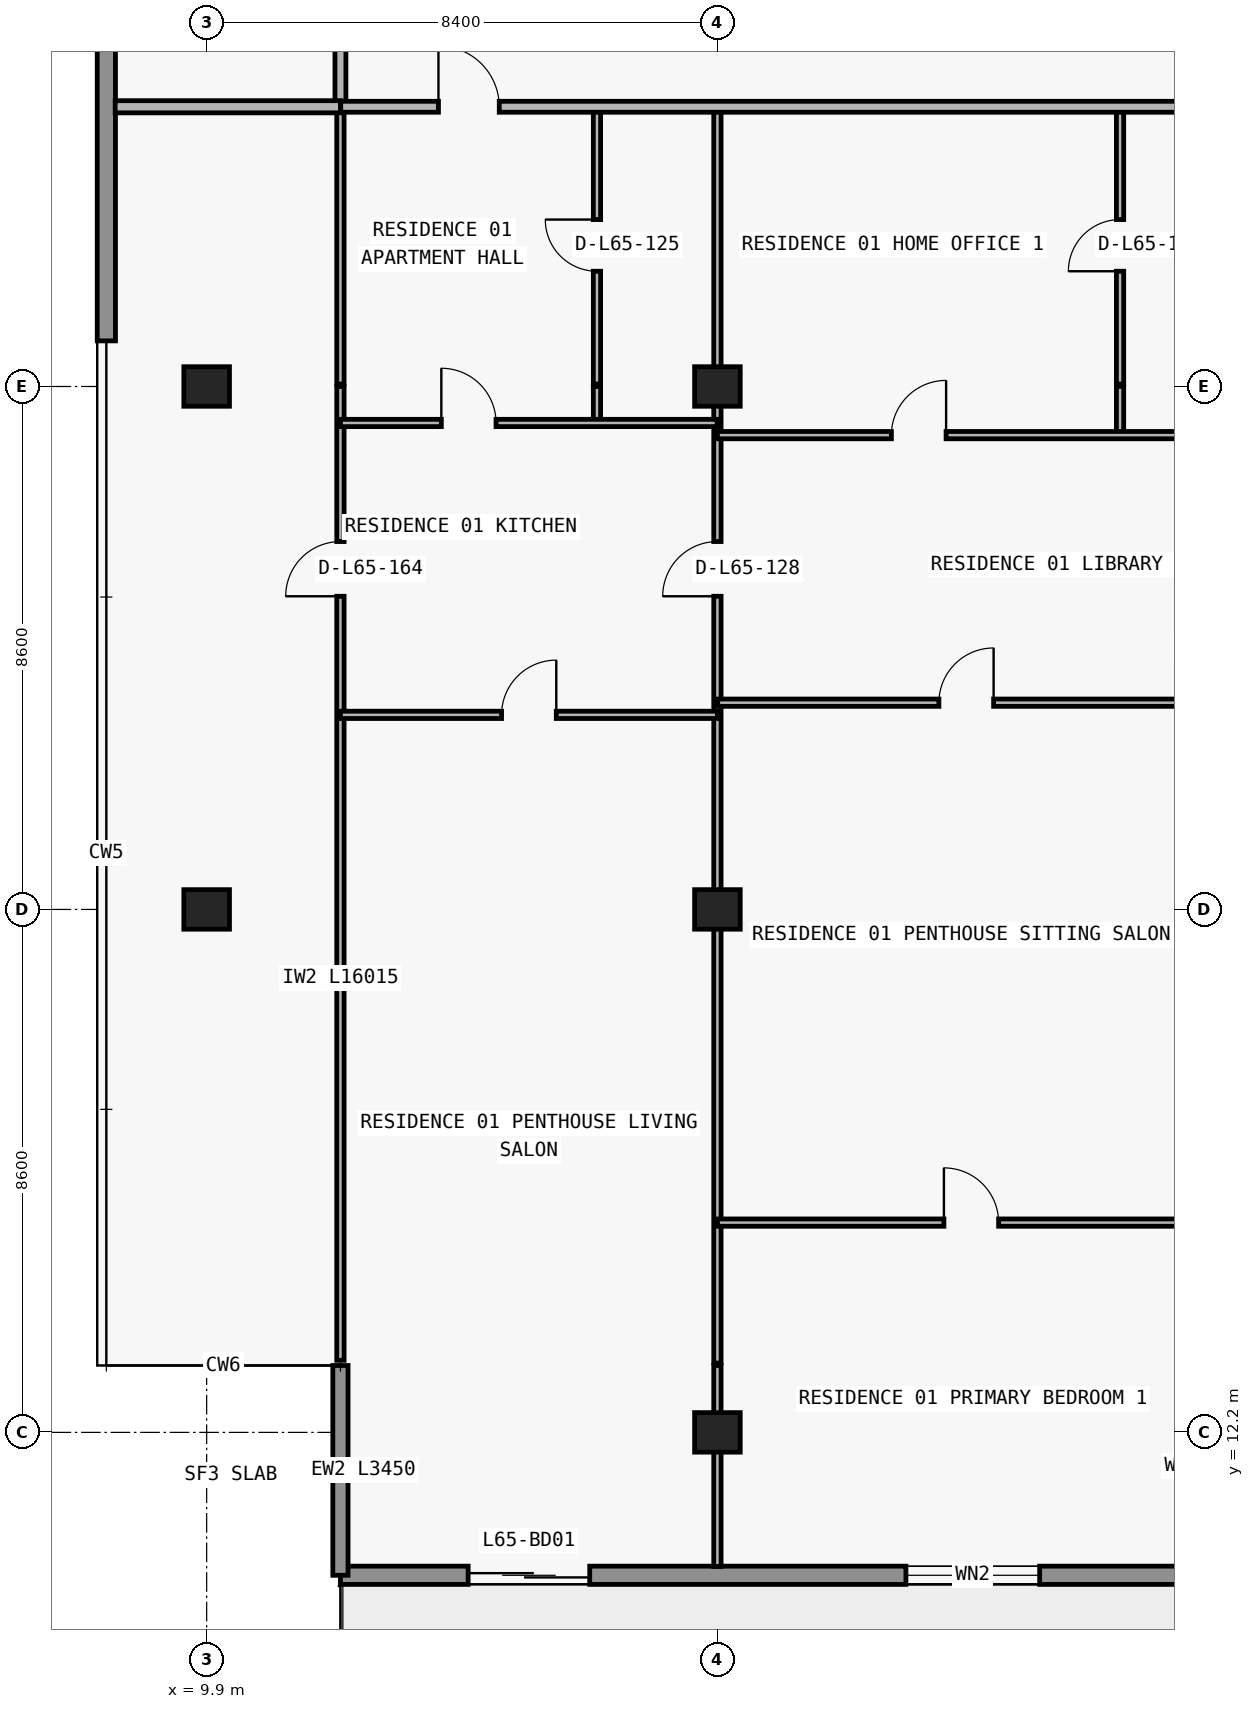
"""IFC4 building model, lengths in metres.
Left out: names, types, materials, properties, quantities, classifications, styles, units other than length and angle.
Written with IfcOpenShell. Run it as: python <this file> out.ifc"""

import sys

from ifc_helpers import new_model, si_unit, direction, frame, frame_2d, origin, origin_2d, place, context, subcontext, project, spatial, rectangle, extrude, element, fill, save


model = new_model("IFC4")
c1 = context("Model", 3, precision=1e-05, world=origin(), true_north=direction((0.0, 1.0)))
c2 = subcontext(c1, "Body", "Model", "MODEL_VIEW")
j1 = project(units=[si_unit("LENGTHUNIT", "METRE"), si_unit("PLANEANGLEUNIT", "RADIAN")], contexts=[c1])
p1 = place(None, origin())
s1 = spatial("IfcSite", under=j1, at=p1, CompositionType="ELEMENT")
p2 = place(p1, origin())
s2 = spatial("IfcBuilding", under=s1, at=p2, CompositionType="ELEMENT")
p3 = place(p2, frame((0.0, 0.0, 233.1)))
s3 = spatial("IfcBuildingStorey", under=s2, at=p3, CompositionType="ELEMENT", Elevation=233.1)
for number, where, z_axis, x_axis in (
    (1, (18.3, 12.2, 0.0), (0.0, 0.0, 1.0), (1.0, 0.0, 0.0)),
    (2, (9.9, 20.8, 0.0), (0.0, 0.0, 1.0), (1.0, 0.0, 0.0)),
    (3, (18.3, 20.8, 0.0), (0.0, 0.0, 1.0), (1.0, 0.0, 0.0)),
    (4, (9.9, 29.4, 0.0), (0.0, 0.0, 1.0), (1.0, 0.0, 0.0)),
    (5, (18.3, 29.4, 0.0), (0.0, 0.0, 1.0), (1.0, 0.0, 0.0)),
):
    element("IfcColumn", number, at=place(p3, frame(where, z_axis=z_axis, x_axis=x_axis)), inside=s3, PredefinedType="COLUMN", context=c2, shape_type="SweptSolid", body=[
        extrude(rectangle(XDim=0.75, YDim=0.65, at=origin_2d()), origin(), (0.0, 0.0, 1.0), 3.05),
    ])
p4 = place(p3, frame((65.7, 9.85, 0.0), z_axis=(0.0, 0.0, 1.0), x_axis=(-1.0, 0.0, 0.0)))
e6 = element("IfcWall", 6, at=p4, inside=s3, PredefinedType="STANDARD", context=c2, shape_type="SweptSolid", body=[
    extrude(rectangle(XDim=53.6, YDim=0.3, at=frame_2d((26.8, 0.0))), origin(), (0.0, 0.0, 1.0), 3.05),
])
p5 = place(p4, frame((49.5, 0.0, 0.0)))
e7 = element("IfcOpeningElement", 7, at=p5, cuts=e6, PredefinedType="OPENING", context=c2, shape_type="SweptSolid", body=[
    extrude(rectangle(XDim=2.0, YDim=2.3, at=frame_2d((1.0, 1.15))), frame((0.0, 0.16, 0.0), z_axis=(0.0, -1.0, 0.0), x_axis=(1.0, 0.0, 0.0)), (0.0, 0.0, 1.0), 0.32),
])
p6 = place(p4, frame((42.1, 0.0, 0.85)))
e8 = element("IfcOpeningElement", 8, at=p6, cuts=e6, PredefinedType="OPENING", context=c2, shape_type="SweptSolid", body=[
    extrude(rectangle(XDim=2.2, YDim=1.55, at=frame_2d((1.1, 0.775))), frame((0.0, 0.16, 0.0), z_axis=(0.0, -1.0, 0.0), x_axis=(1.0, 0.0, 0.0)), (0.0, 0.0, 1.0), 0.32),
])
p7 = place(p4, frame((35.69, 0.0, 0.0)))
e9 = element("IfcOpeningElement", 9, at=p7, cuts=e6, PredefinedType="OPENING", context=c2, shape_type="SweptSolid", body=[
    extrude(rectangle(XDim=2.0, YDim=2.3, at=frame_2d((1.0, 1.15))), frame((0.0, 0.16, 0.0), z_axis=(0.0, -1.0, 0.0), x_axis=(1.0, 0.0, 0.0)), (0.0, 0.0, 1.0), 0.32),
])
p8 = place(p4, frame((31.59, 0.0, 0.85)))
e10 = element("IfcOpeningElement", 10, at=p8, cuts=e6, PredefinedType="OPENING", context=c2, shape_type="SweptSolid", body=[
    extrude(rectangle(XDim=1.8, YDim=1.55, at=frame_2d((0.9, 0.775))), frame((0.0, 0.16, 0.0), z_axis=(0.0, -1.0, 0.0), x_axis=(1.0, 0.0, 0.0)), (0.0, 0.0, 1.0), 0.32),
])
p9 = place(p4, frame((23.914, 0.0, 0.85)))
e11 = element("IfcOpeningElement", 11, at=p9, cuts=e6, PredefinedType="OPENING", context=c2, shape_type="SweptSolid", body=[
    extrude(rectangle(XDim=2.2, YDim=1.55, at=frame_2d((1.1, 0.775))), frame((0.0, 0.16, 0.0), z_axis=(0.0, -1.0, 0.0), x_axis=(1.0, 0.0, 0.0)), (0.0, 0.0, 1.0), 0.32),
])
p10 = place(p4, frame((19.69, 0.0, 0.0)))
e12 = element("IfcOpeningElement", 12, at=p10, cuts=e6, PredefinedType="OPENING", context=c2, shape_type="SweptSolid", body=[
    extrude(rectangle(XDim=2.0, YDim=2.3, at=frame_2d((1.0, 1.15))), frame((0.0, 0.16, 0.0), z_axis=(0.0, -1.0, 0.0), x_axis=(1.0, 0.0, 0.0)), (0.0, 0.0, 1.0), 0.32),
])
p11 = place(p4, frame((15.59, 0.0, 0.85)))
e13 = element("IfcOpeningElement", 13, at=p11, cuts=e6, PredefinedType="OPENING", context=c2, shape_type="SweptSolid", body=[
    extrude(rectangle(XDim=1.8, YDim=1.55, at=frame_2d((0.9, 0.775))), frame((0.0, 0.16, 0.0), z_axis=(0.0, -1.0, 0.0), x_axis=(1.0, 0.0, 0.0)), (0.0, 0.0, 1.0), 0.32),
])
p12 = place(p4, frame((11.69, 0.0, 0.0)))
e14 = element("IfcOpeningElement", 14, at=p12, cuts=e6, PredefinedType="OPENING", context=c2, shape_type="SweptSolid", body=[
    extrude(rectangle(XDim=2.0, YDim=2.3, at=frame_2d((1.0, 1.15))), frame((0.0, 0.16, 0.0), z_axis=(0.0, -1.0, 0.0), x_axis=(1.0, 0.0, 0.0)), (0.0, 0.0, 1.0), 0.32),
])
p13 = place(p4, frame((7.01, 0.0, 0.65)))
e15 = element("IfcOpeningElement", 15, at=p13, cuts=e6, PredefinedType="OPENING", context=c2, shape_type="SweptSolid", body=[
    extrude(rectangle(XDim=2.6, YDim=1.85, at=frame_2d((1.3, 0.925))), frame((0.0, 0.16, 0.0), z_axis=(0.0, -1.0, 0.0), x_axis=(1.0, 0.0, 0.0)), (0.0, 0.0, 1.0), 0.32),
])
p14 = place(p4, frame((2.0, 0.0, 0.85)))
e16 = element("IfcOpeningElement", 16, at=p14, cuts=e6, PredefinedType="OPENING", context=c2, shape_type="SweptSolid", body=[
    extrude(rectangle(XDim=2.2, YDim=1.55, at=frame_2d((1.1, 0.775))), frame((0.0, 0.16, 0.0), z_axis=(0.0, -1.0, 0.0), x_axis=(1.0, 0.0, 0.0)), (0.0, 0.0, 1.0), 0.32),
])
p15 = place(p3, frame((12.1, 13.3, 0.0), z_axis=(0.0, 0.0, 1.0), x_axis=(0.0, -1.0, 0.0)))
e17 = element("IfcWall", 17, at=p15, inside=s3, PredefinedType="ELEMENTEDWALL", context=c2, shape_type="SweptSolid", body=[
    extrude(rectangle(XDim=3.45, YDim=0.25, at=frame_2d((1.725, 0.0))), origin(), (0.0, 0.0, 1.0), 3.05),
])
p16 = place(p3, frame((8.25, 30.15, 0.0), z_axis=(0.0, 0.0, 1.0), x_axis=(0.0, 1.0, 0.0)))
e18 = element("IfcWall", 18, at=p16, inside=s3, PredefinedType="STANDARD", context=c2, shape_type="SweptSolid", body=[
    extrude(rectangle(XDim=16.85, YDim=0.3, at=frame_2d((8.425, 0.0))), origin(), (0.0, 0.0, 1.0), 3.05),
])
p17 = place(p3, frame((12.1, 13.385, 0.0), z_axis=(0.0, 0.0, 1.0), x_axis=(0.0, 1.0, 0.0)))
e19 = element("IfcWall", 19, at=p17, inside=s3, PredefinedType="PARTITIONING", context=c2, shape_type="SweptSolid", body=[
    extrude(rectangle(XDim=16.015, YDim=0.12, at=frame_2d((8.007, 0.0))), origin(), (0.0, 0.0, 1.0), 2.725),
])
p18 = place(p17, frame((12.565, 0.0, 0.0)))
e20 = element("IfcOpeningElement", 20, at=p18, cuts=e19, PredefinedType="OPENING", context=c2, shape_type="SweptSolid", body=[
    extrude(rectangle(XDim=0.9, YDim=2.15, at=frame_2d((0.45, 1.075))), frame((0.0, 0.07, 0.0), z_axis=(0.0, -1.0, 0.0), x_axis=(1.0, 0.0, 0.0)), (0.0, 0.0, 1.0), 0.14),
])
p19 = place(p3, frame((12.1, 29.44, 0.0), z_axis=(0.0, 0.0, 1.0), x_axis=(0.0, 1.0, 0.0)))
e21 = element("IfcWall", 21, at=p19, inside=s3, PredefinedType="PARTITIONING", context=c2, shape_type="SweptSolid", body=[
    extrude(rectangle(XDim=4.56, YDim=0.12, at=frame_2d((2.28, 0.0))), origin(), (0.0, 0.0, 1.0), 2.725),
])
p20 = place(p3, frame((12.1, 34.005, 0.0), z_axis=(0.0, 0.0, 1.0), x_axis=(0.0, 1.0, 0.0)))
e22 = element("IfcWall", 22, at=p20, inside=s3, PredefinedType="PARTITIONING", context=c2, shape_type="SweptSolid", body=[
    extrude(rectangle(XDim=2.995, YDim=0.18, at=frame_2d((1.498, 0.0))), origin(), (0.0, 0.0, 1.0), 2.725),
])
p21 = place(p3, frame((16.319, 28.8, 0.0), z_axis=(0.0, 0.0, 1.0), x_axis=(0.0, 1.0, 0.0)))
e23 = element("IfcWall", 23, at=p21, inside=s3, PredefinedType="PARTITIONING", context=c2, shape_type="SweptSolid", body=[
    extrude(rectangle(XDim=0.6, YDim=0.12, at=frame_2d((0.3, 0.0))), origin(), (0.0, 0.0, 1.0), 2.629),
])
p22 = place(p3, frame((16.319, 29.44, 0.0), z_axis=(0.0, 0.0, 1.0), x_axis=(0.0, 1.0, 0.0)))
e24 = element("IfcWall", 24, at=p22, inside=s3, PredefinedType="PARTITIONING", context=c2, shape_type="SweptSolid", body=[
    extrude(rectangle(XDim=4.56, YDim=0.12, at=frame_2d((2.28, 0.0))), origin(), (0.0, 0.0, 1.0), 2.629),
])
p23 = place(p22, frame((1.855, 0.0, 0.0)))
e25 = element("IfcOpeningElement", 25, at=p23, cuts=e24, PredefinedType="OPENING", context=c2, shape_type="SweptSolid", body=[
    extrude(rectangle(XDim=0.85, YDim=2.1, at=frame_2d((0.425, 1.05))), frame((0.0, 0.07, 0.0), z_axis=(0.0, -1.0, 0.0), x_axis=(1.0, 0.0, 0.0)), (0.0, 0.0, 1.0), 0.14),
])
p24 = place(p3, frame((18.3, 9.995, 0.0), z_axis=(0.0, 0.0, 1.0), x_axis=(0.0, 1.0, 0.0)))
e26 = element("IfcWall", 26, at=p24, inside=s3, PredefinedType="PARTITIONING", context=c2, shape_type="SweptSolid", body=[
    extrude(rectangle(XDim=3.305, YDim=0.12, at=frame_2d((1.652, 0.0))), origin(), (0.0, 0.0, 1.0), 2.263),
])
p25 = place(p3, frame((18.3, 13.34, 0.0), z_axis=(0.0, 0.0, 1.0), x_axis=(0.0, 1.0, 0.0)))
e27 = element("IfcWall", 27, at=p25, inside=s3, PredefinedType="PARTITIONING", context=c2, shape_type="SweptSolid", body=[
    extrude(rectangle(XDim=16.06, YDim=0.12, at=frame_2d((8.03, 0.0))), origin(), (0.0, 0.0, 1.0), 2.263),
])
p26 = place(p25, frame((12.61, 0.0, 0.0)))
e28 = element("IfcOpeningElement", 28, at=p26, cuts=e27, PredefinedType="OPENING", context=c2, shape_type="SweptSolid", body=[
    extrude(rectangle(XDim=0.9, YDim=2.15, at=frame_2d((0.45, 1.075))), frame((0.0, 0.07, 0.0), z_axis=(0.0, -1.0, 0.0), x_axis=(1.0, 0.0, 0.0)), (0.0, 0.0, 1.0), 0.14),
])
p27 = place(p3, frame((18.3, 29.44, 0.0), z_axis=(0.0, 0.0, 1.0), x_axis=(0.0, 1.0, 0.0)))
e29 = element("IfcWall", 29, at=p27, inside=s3, PredefinedType="PARTITIONING", context=c2, shape_type="SweptSolid", body=[
    extrude(rectangle(XDim=4.56, YDim=0.12, at=frame_2d((2.28, 0.0))), origin(), (0.0, 0.0, 1.0), 2.263),
])
p28 = place(p3, frame((24.922, 28.6, 0.0), z_axis=(0.0, 0.0, 1.0), x_axis=(0.0, 1.0, 0.0)))
e30 = element("IfcWall", 30, at=p28, inside=s3, PredefinedType="PARTITIONING", context=c2, shape_type="SweptSolid", body=[
    extrude(rectangle(XDim=0.8, YDim=0.12, at=frame_2d((0.4, 0.0))), origin(), (0.0, 0.0, 1.0), 3.05),
])
p29 = place(p3, frame((24.922, 29.44, 0.0), z_axis=(0.0, 0.0, 1.0), x_axis=(0.0, 1.0, 0.0)))
e31 = element("IfcWall", 31, at=p29, inside=s3, PredefinedType="PARTITIONING", context=c2, shape_type="SweptSolid", body=[
    extrude(rectangle(XDim=4.56, YDim=0.12, at=frame_2d((2.28, 0.0))), origin(), (0.0, 0.0, 1.0), 3.05),
])
p30 = place(p29, frame((1.855, 0.0, 0.0)))
e32 = element("IfcOpeningElement", 32, at=p30, cuts=e31, PredefinedType="OPENING", context=c2, shape_type="SweptSolid", body=[
    extrude(rectangle(XDim=0.85, YDim=2.1, at=frame_2d((0.425, 1.05))), frame((0.0, 0.07, 0.0), z_axis=(0.0, -1.0, 0.0), x_axis=(1.0, 0.0, 0.0)), (0.0, 0.0, 1.0), 0.14),
])
p31 = place(p3, frame((18.3, 15.65, 0.0), z_axis=(0.0, 0.0, 1.0), x_axis=(1.0, 0.0, 0.0)))
e33 = element("IfcWall", 33, at=p31, inside=s3, PredefinedType="PARTITIONING", context=c2, shape_type="SweptSolid", body=[
    extrude(rectangle(XDim=8.35, YDim=0.12, at=frame_2d((4.175, 0.0))), origin(), (0.0, 0.0, 1.0), 3.05),
])
p32 = place(p31, frame((3.725, 0.0, 0.0)))
e34 = element("IfcOpeningElement", 34, at=p32, cuts=e33, PredefinedType="OPENING", context=c2, shape_type="SweptSolid", body=[
    extrude(rectangle(XDim=0.9, YDim=2.15, at=frame_2d((0.45, 1.075))), frame((0.0, 0.07, 0.0), z_axis=(0.0, -1.0, 0.0), x_axis=(1.0, 0.0, 0.0)), (0.0, 0.0, 1.0), 0.14),
])
p33 = place(p3, frame((12.1, 24.0, 0.0), z_axis=(0.0, 0.0, 1.0), x_axis=(1.0, 0.0, 0.0)))
e35 = element("IfcWall", 35, at=p33, inside=s3, PredefinedType="PARTITIONING", context=c2, shape_type="SweptSolid", body=[
    extrude(rectangle(XDim=6.2, YDim=0.12, at=frame_2d((3.1, 0.0))), origin(), (0.0, 0.0, 1.0), 3.05),
])
p34 = place(p33, frame((2.65, 0.0, 0.0)))
e36 = element("IfcOpeningElement", 36, at=p34, cuts=e35, PredefinedType="OPENING", context=c2, shape_type="SweptSolid", body=[
    extrude(rectangle(XDim=0.9, YDim=2.15, at=frame_2d((0.45, 1.075))), frame((0.0, 0.07, 0.0), z_axis=(0.0, -1.0, 0.0), x_axis=(1.0, 0.0, 0.0)), (0.0, 0.0, 1.0), 0.14),
])
p35 = place(p3, frame((18.305, 24.2, 0.0), z_axis=(0.0, 0.0, 1.0), x_axis=(1.0, 0.0, 0.0)))
e37 = element("IfcWall", 37, at=p35, inside=s3, PredefinedType="PARTITIONING", context=c2, shape_type="SweptSolid", body=[
    extrude(rectangle(XDim=8.175, YDim=0.12, at=frame_2d((4.087, 0.0))), origin(), (0.0, 0.0, 1.0), 3.05),
])
p36 = place(p35, frame((3.637, 0.0, 0.0)))
e38 = element("IfcOpeningElement", 38, at=p36, cuts=e37, PredefinedType="OPENING", context=c2, shape_type="SweptSolid", body=[
    extrude(rectangle(XDim=0.9, YDim=2.15, at=frame_2d((0.45, 1.075))), frame((0.0, 0.07, 0.0), z_axis=(0.0, -1.0, 0.0), x_axis=(1.0, 0.0, 0.0)), (0.0, 0.0, 1.0), 0.14),
])
p37 = place(p3, frame((18.3, 28.6, 0.0), z_axis=(0.0, 0.0, 1.0), x_axis=(1.0, 0.0, 0.0)))
e39 = element("IfcWall", 39, at=p37, inside=s3, PredefinedType="PARTITIONING", context=c2, shape_type="SweptSolid", body=[
    extrude(rectangle(XDim=8.18, YDim=0.12, at=frame_2d((4.09, 0.0))), origin(), (0.0, 0.0, 1.0), 3.05),
])
p38 = place(p37, frame((2.861, 0.0, 0.0)))
e40 = element("IfcOpeningElement", 40, at=p38, cuts=e39, PredefinedType="OPENING", context=c2, shape_type="SweptSolid", body=[
    extrude(rectangle(XDim=0.9, YDim=2.15, at=frame_2d((0.45, 1.075))), frame((0.0, 0.07, 0.0), z_axis=(0.0, -1.0, 0.0), x_axis=(1.0, 0.0, 0.0)), (0.0, 0.0, 1.0), 0.14),
])
p39 = place(p3, frame((12.1, 28.8, 0.0), z_axis=(0.0, 0.0, 1.0), x_axis=(1.0, 0.0, 0.0)))
e41 = element("IfcWall", 41, at=p39, inside=s3, PredefinedType="PARTITIONING", context=c2, shape_type="SweptSolid", body=[
    extrude(rectangle(XDim=6.195, YDim=0.12, at=frame_2d((3.097, 0.0))), origin(), (0.0, 0.0, 1.0), 3.05),
])
p40 = place(p39, frame((1.659, 0.0, 0.0)))
e42 = element("IfcOpeningElement", 42, at=p40, cuts=e41, PredefinedType="OPENING", context=c2, shape_type="SweptSolid", body=[
    extrude(rectangle(XDim=0.9, YDim=2.15, at=frame_2d((0.45, 1.075))), frame((0.0, 0.07, 0.0), z_axis=(0.0, -1.0, 0.0), x_axis=(1.0, 0.0, 0.0)), (0.0, 0.0, 1.0), 0.14),
])
p41 = place(p3, frame((8.395, 34.0, 0.0), z_axis=(0.0, 0.0, 1.0), x_axis=(1.0, 0.0, 0.0)))
e43 = element("IfcWall", 43, at=p41, inside=s3, PredefinedType="PARTITIONING", context=c2, shape_type="SweptSolid", body=[
    extrude(rectangle(XDim=3.705, YDim=0.2, at=frame_2d((1.853, 0.0))), origin(), (0.0, 0.0, 1.0), 3.05),
])
p42 = place(p3, frame((12.105, 34.0, 0.0), z_axis=(0.0, 0.0, 1.0), x_axis=(1.0, 0.0, 0.0)))
e44 = element("IfcWall", 44, at=p42, inside=s3, PredefinedType="PARTITIONING", context=c2, shape_type="SweptSolid", body=[
    extrude(rectangle(XDim=14.545, YDim=0.18, at=frame_2d((7.272, 0.0))), origin(), (0.0, 0.0, 1.0), 3.05),
])
p43 = place(p42, frame((1.607, 0.0, 0.0)))
e45 = element("IfcOpeningElement", 45, at=p43, cuts=e44, PredefinedType="OPENING", context=c2, shape_type="SweptSolid", body=[
    extrude(rectangle(XDim=1.0, YDim=2.2, at=frame_2d((0.5, 1.1))), frame((0.0, 0.1, 0.0), z_axis=(0.0, -1.0, 0.0), x_axis=(1.0, 0.0, 0.0)), (0.0, 0.0, 1.0), 0.2),
])
p44 = place(p5, origin())
e46 = element("IfcDoor", 46, at=p44, inside=s3, OperationType="DOUBLE_DOOR_SLIDING", PredefinedType="DOOR", context=c2, shape_type="SweptSolid", body=[
    extrude(rectangle(XDim=2.0, YDim=2.3, at=frame_2d((1.0, 1.15))), frame((0.0, 0.025, 0.0), z_axis=(0.0, -1.0, 0.0), x_axis=(1.0, 0.0, 0.0)), (0.0, 0.0, 1.0), 0.05),
])
fill(e7, e46)
p45 = place(p6, origin())
e47 = element("IfcWindow", 47, at=p45, inside=s3, PartitioningType="SINGLE_PANEL", PredefinedType="WINDOW", context=c2, shape_type="SweptSolid", body=[
    extrude(rectangle(XDim=2.2, YDim=1.55, at=frame_2d((1.1, 0.775))), frame((0.0, 0.03, 0.0), z_axis=(0.0, -1.0, 0.0), x_axis=(1.0, 0.0, 0.0)), (0.0, 0.0, 1.0), 0.06),
])
fill(e8, e47)
p46 = place(p43, origin())
e48 = element("IfcDoor", 48, at=p46, inside=s3, OperationType="SINGLE_SWING_LEFT", PredefinedType="DOOR", context=c2, shape_type="SweptSolid", body=[
    extrude(rectangle(XDim=1.0, YDim=2.2, at=frame_2d((0.5, 1.1))), frame((0.0, 0.025, 0.0), z_axis=(0.0, -1.0, 0.0), x_axis=(1.0, 0.0, 0.0)), (0.0, 0.0, 1.0), 0.05),
])
fill(e45, e48)
p47 = place(p23, origin())
e49 = element("IfcDoor", 49, at=p47, inside=s3, OperationType="SINGLE_SWING_RIGHT", PredefinedType="DOOR", context=c2, shape_type="SweptSolid", body=[
    extrude(rectangle(XDim=0.85, YDim=2.1, at=frame_2d((0.425, 1.05))), frame((0.0, 0.025, 0.0), z_axis=(0.0, -1.0, 0.0), x_axis=(1.0, 0.0, 0.0)), (0.0, 0.0, 1.0), 0.05),
])
fill(e25, e49)
p48 = place(p40, origin())
e50 = element("IfcDoor", 50, at=p48, inside=s3, OperationType="SINGLE_SWING_LEFT", PredefinedType="DOOR", context=c2, shape_type="SweptSolid", body=[
    extrude(rectangle(XDim=0.9, YDim=2.15, at=frame_2d((0.45, 1.075))), frame((0.0, 0.025, 0.0), z_axis=(0.0, -1.0, 0.0), x_axis=(1.0, 0.0, 0.0)), (0.0, 0.0, 1.0), 0.05),
])
fill(e42, e50)
p49 = place(p34, origin())
e51 = element("IfcDoor", 51, at=p49, inside=s3, OperationType="SINGLE_SWING_RIGHT", PredefinedType="DOOR", context=c2, shape_type="SweptSolid", body=[
    extrude(rectangle(XDim=0.9, YDim=2.15, at=frame_2d((0.45, 1.075))), frame((0.0, 0.025, 0.0), z_axis=(0.0, -1.0, 0.0), x_axis=(1.0, 0.0, 0.0)), (0.0, 0.0, 1.0), 0.05),
])
fill(e36, e51)
p50 = place(p26, origin())
e52 = element("IfcDoor", 52, at=p50, inside=s3, OperationType="SINGLE_SWING_LEFT", PredefinedType="DOOR", context=c2, shape_type="SweptSolid", body=[
    extrude(rectangle(XDim=0.9, YDim=2.15, at=frame_2d((0.45, 1.075))), frame((0.0, 0.025, 0.0), z_axis=(0.0, -1.0, 0.0), x_axis=(1.0, 0.0, 0.0)), (0.0, 0.0, 1.0), 0.05),
])
fill(e28, e52)
p51 = place(p38, origin())
e53 = element("IfcDoor", 53, at=p51, inside=s3, OperationType="SINGLE_SWING_RIGHT", PredefinedType="DOOR", context=c2, shape_type="SweptSolid", body=[
    extrude(rectangle(XDim=0.9, YDim=2.15, at=frame_2d((0.45, 1.075))), frame((0.0, 0.025, 0.0), z_axis=(0.0, -1.0, 0.0), x_axis=(1.0, 0.0, 0.0)), (0.0, 0.0, 1.0), 0.05),
])
fill(e40, e53)
p52 = place(p30, origin())
e54 = element("IfcDoor", 54, at=p52, inside=s3, OperationType="SINGLE_SWING_LEFT", PredefinedType="DOOR", context=c2, shape_type="SweptSolid", body=[
    extrude(rectangle(XDim=0.85, YDim=2.1, at=frame_2d((0.425, 1.05))), frame((0.0, 0.025, 0.0), z_axis=(0.0, -1.0, 0.0), x_axis=(1.0, 0.0, 0.0)), (0.0, 0.0, 1.0), 0.05),
])
fill(e32, e54)
p53 = place(p36, origin())
e55 = element("IfcDoor", 55, at=p53, inside=s3, OperationType="SINGLE_SWING_RIGHT", PredefinedType="DOOR", context=c2, shape_type="SweptSolid", body=[
    extrude(rectangle(XDim=0.9, YDim=2.15, at=frame_2d((0.45, 1.075))), frame((0.0, 0.025, 0.0), z_axis=(0.0, -1.0, 0.0), x_axis=(1.0, 0.0, 0.0)), (0.0, 0.0, 1.0), 0.05),
])
fill(e38, e55)
p54 = place(p32, origin())
e56 = element("IfcDoor", 56, at=p54, inside=s3, OperationType="SINGLE_SWING_LEFT", PredefinedType="DOOR", context=c2, shape_type="SweptSolid", body=[
    extrude(rectangle(XDim=0.9, YDim=2.15, at=frame_2d((0.45, 1.075))), frame((0.0, 0.025, 0.0), z_axis=(0.0, -1.0, 0.0), x_axis=(1.0, 0.0, 0.0)), (0.0, 0.0, 1.0), 0.05),
])
fill(e34, e56)
p55 = place(p18, origin())
e57 = element("IfcDoor", 57, at=p55, inside=s3, OperationType="SINGLE_SWING_LEFT", PredefinedType="DOOR", context=c2, shape_type="SweptSolid", body=[
    extrude(rectangle(XDim=0.9, YDim=2.15, at=frame_2d((0.45, 1.075))), frame((0.0, 0.025, 0.0), z_axis=(0.0, -1.0, 0.0), x_axis=(1.0, 0.0, 0.0)), (0.0, 0.0, 1.0), 0.05),
])
fill(e20, e57)
save(model, sys.argv[1])
